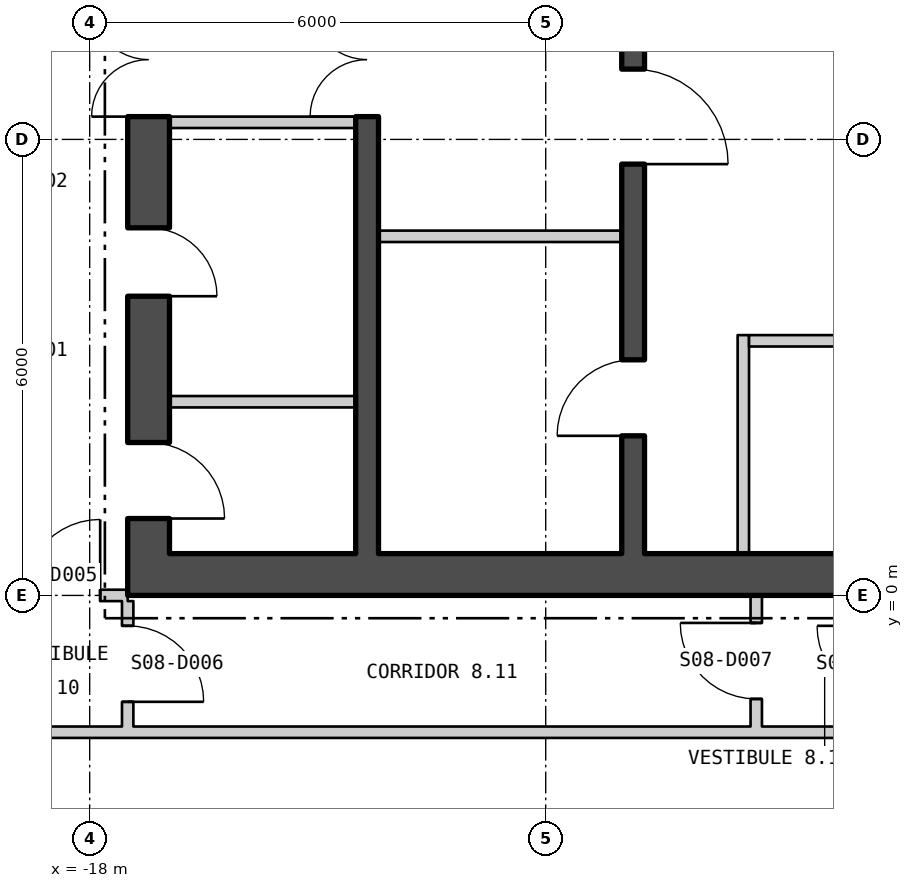
"""IFC4 building model, lengths in metres.
Left out: names, types, materials, properties, quantities, classifications, styles, units other than length and angle.
Written with IfcOpenShell. Run it as: python <this file> out.ifc"""

import sys

from ifc_helpers import new_model, si_unit, direction, frame, frame_2d, origin, place, context, subcontext, project, spatial, polyline, rectangle, outline, extrude, element, fill, save


model = new_model("IFC4")
c1 = context("Model", 3, precision=1e-05, world=origin(), true_north=direction((0.0, 1.0)))
c2 = subcontext(c1, "Body", "Model", "MODEL_VIEW")
j1 = project(units=[si_unit("LENGTHUNIT", "METRE"), si_unit("PLANEANGLEUNIT", "RADIAN")], contexts=[c1])
p1 = place(None, origin())
s1 = spatial("IfcSite", under=j1, at=p1, CompositionType="ELEMENT")
p2 = place(p1, origin())
s2 = spatial("IfcBuilding", under=s1, at=p2, CompositionType="ELEMENT")
p3 = place(p2, frame((0.0, 0.0, 111.3)))
s3 = spatial("IfcBuildingStorey", under=s2, at=p3, CompositionType="ELEMENT", Elevation=111.3)
p4 = place(p3, frame((-27.595, 11.782, -0.18), z_axis=(0.0, 0.0, 1.0), x_axis=(0.500000141277, -0.866025322218, 0.0)))
e1 = element("IfcWall", 1, at=p4, inside=s3, PredefinedType="SOLIDWALL", context=c2, shape_type="SweptSolid", body=[
    extrude(outline(polyline([(-0.13, -0.225), (45.86, -0.225), (45.6, 0.225), (0.13, 0.225), (-0.13, -0.225)])), origin(), (0.0, 0.0, 1.0), 4.28),
])
p5 = place(p4, frame((1.424, 0.0, 1.08)))
e2 = element("IfcOpeningElement", 2, at=p5, cuts=e1, PredefinedType="OPENING", context=c2, shape_type="SweptSolid", body=[
    extrude(rectangle(XDim=2.4, YDim=2.6, at=frame_2d((1.2, 1.3))), frame((0.0, 0.235, 0.0), z_axis=(0.0, -1.0, 0.0), x_axis=(1.0, 0.0, 0.0)), (0.0, 0.0, 1.0), 0.47),
])
p6 = place(p4, frame((5.892, 0.0, 1.08)))
e3 = element("IfcOpeningElement", 3, at=p6, cuts=e1, PredefinedType="OPENING", context=c2, shape_type="SweptSolid", body=[
    extrude(rectangle(XDim=2.4, YDim=2.6, at=frame_2d((1.2, 1.3))), frame((0.0, 0.235, 0.0), z_axis=(0.0, -1.0, 0.0), x_axis=(1.0, 0.0, 0.0)), (0.0, 0.0, 1.0), 0.47),
])
p7 = place(p4, frame((10.399, 0.0, 1.08)))
e4 = element("IfcOpeningElement", 4, at=p7, cuts=e1, PredefinedType="OPENING", context=c2, shape_type="SweptSolid", body=[
    extrude(rectangle(XDim=2.4, YDim=2.6, at=frame_2d((1.2, 1.3))), frame((0.0, 0.235, 0.0), z_axis=(0.0, -1.0, 0.0), x_axis=(1.0, 0.0, 0.0)), (0.0, 0.0, 1.0), 0.47),
])
p8 = place(p4, frame((14.905, 0.0, 1.08)))
e5 = element("IfcOpeningElement", 5, at=p8, cuts=e1, PredefinedType="OPENING", context=c2, shape_type="SweptSolid", body=[
    extrude(rectangle(XDim=2.4, YDim=2.6, at=frame_2d((1.2, 1.3))), frame((0.0, 0.235, 0.0), z_axis=(0.0, -1.0, 0.0), x_axis=(1.0, 0.0, 0.0)), (0.0, 0.0, 1.0), 0.47),
])
p9 = place(p4, frame((19.412, 0.0, 1.08)))
e6 = element("IfcOpeningElement", 6, at=p9, cuts=e1, PredefinedType="OPENING", context=c2, shape_type="SweptSolid", body=[
    extrude(rectangle(XDim=2.4, YDim=2.6, at=frame_2d((1.2, 1.3))), frame((0.0, 0.235, 0.0), z_axis=(0.0, -1.0, 0.0), x_axis=(1.0, 0.0, 0.0)), (0.0, 0.0, 1.0), 0.47),
])
p10 = place(p4, frame((23.918, 0.0, 1.08)))
e7 = element("IfcOpeningElement", 7, at=p10, cuts=e1, PredefinedType="OPENING", context=c2, shape_type="SweptSolid", body=[
    extrude(rectangle(XDim=2.4, YDim=2.6, at=frame_2d((1.2, 1.3))), frame((0.0, 0.235, 0.0), z_axis=(0.0, -1.0, 0.0), x_axis=(1.0, 0.0, 0.0)), (0.0, 0.0, 1.0), 0.47),
])
p11 = place(p4, frame((28.425, 0.0, 1.08)))
e8 = element("IfcOpeningElement", 8, at=p11, cuts=e1, PredefinedType="OPENING", context=c2, shape_type="SweptSolid", body=[
    extrude(rectangle(XDim=2.4, YDim=2.6, at=frame_2d((1.2, 1.3))), frame((0.0, 0.235, 0.0), z_axis=(0.0, -1.0, 0.0), x_axis=(1.0, 0.0, 0.0)), (0.0, 0.0, 1.0), 0.47),
])
p12 = place(p4, frame((32.932, 0.0, 1.08)))
e9 = element("IfcOpeningElement", 9, at=p12, cuts=e1, PredefinedType="OPENING", context=c2, shape_type="SweptSolid", body=[
    extrude(rectangle(XDim=2.4, YDim=2.6, at=frame_2d((1.2, 1.3))), frame((0.0, 0.235, 0.0), z_axis=(0.0, -1.0, 0.0), x_axis=(1.0, 0.0, 0.0)), (0.0, 0.0, 1.0), 0.47),
])
p13 = place(p4, frame((37.438, 0.0, 1.08)))
e10 = element("IfcOpeningElement", 10, at=p13, cuts=e1, PredefinedType="OPENING", context=c2, shape_type="SweptSolid", body=[
    extrude(rectangle(XDim=2.4, YDim=2.6, at=frame_2d((1.2, 1.3))), frame((0.0, 0.235, 0.0), z_axis=(0.0, -1.0, 0.0), x_axis=(1.0, 0.0, 0.0)), (0.0, 0.0, 1.0), 0.47),
])
p14 = place(p4, frame((41.907, 0.0, 1.08)))
e11 = element("IfcOpeningElement", 11, at=p14, cuts=e1, PredefinedType="OPENING", context=c2, shape_type="SweptSolid", body=[
    extrude(rectangle(XDim=2.4, YDim=2.6, at=frame_2d((1.2, 1.3))), frame((0.0, 0.235, 0.0), z_axis=(0.0, -1.0, 0.0), x_axis=(1.0, 0.0, 0.0)), (0.0, 0.0, 1.0), 0.47),
])
p15 = place(p3, frame((-17.5, 0.275, 0.0), z_axis=(0.0, 0.0, 1.0), x_axis=(1.0, 0.0, 0.0)))
e12 = element("IfcWall", 12, at=p15, inside=s3, PredefinedType="SHEAR", context=c2, shape_type="SweptSolid", body=[
    extrude(rectangle(XDim=35.0, YDim=0.55, at=frame_2d((17.5, 0.0))), origin(), (0.0, 0.0, 1.0), 4.3),
])
p16 = place(p15, frame((12.0, 0.0, 0.0)))
e13 = element("IfcOpeningElement", 13, at=p16, cuts=e12, PredefinedType="OPENING", context=c2, shape_type="SweptSolid", body=[
    extrude(rectangle(XDim=1.8, YDim=2.4, at=frame_2d((0.9, 1.2))), frame((0.0, 0.285, 0.0), z_axis=(0.0, -1.0, 0.0), x_axis=(1.0, 0.0, 0.0)), (0.0, 0.0, 1.0), 0.57),
])
p17 = place(p15, frame((22.0, 0.0, 0.0)))
e14 = element("IfcOpeningElement", 14, at=p17, cuts=e12, PredefinedType="OPENING", context=c2, shape_type="SweptSolid", body=[
    extrude(rectangle(XDim=1.8, YDim=2.4, at=frame_2d((0.9, 1.2))), frame((0.0, 0.285, 0.0), z_axis=(0.0, -1.0, 0.0), x_axis=(1.0, 0.0, 0.0)), (0.0, 0.0, 1.0), 0.57),
])
p18 = place(p3, frame((-17.225, 0.55, 0.0), z_axis=(0.0, 0.0, 1.0), x_axis=(0.0, 1.0, 0.0)))
e15 = element("IfcWall", 15, at=p18, inside=s3, PredefinedType="SHEAR", context=c2, shape_type="SweptSolid", body=[
    extrude(rectangle(XDim=16.9, YDim=0.55, at=frame_2d((8.45, 0.0))), origin(), (0.0, 0.0, 1.0), 4.3),
])
p19 = place(p18, frame((5.75, 0.0, 0.0)))
e16 = element("IfcOpeningElement", 16, at=p19, cuts=e15, PredefinedType="OPENING", context=c2, shape_type="SweptSolid", body=[
    extrude(rectangle(XDim=1.5, YDim=2.1, at=frame_2d((0.75, 1.05))), frame((0.0, 0.285, 0.0), z_axis=(0.0, -1.0, 0.0), x_axis=(1.0, 0.0, 0.0)), (0.0, 0.0, 1.0), 0.57),
])
p20 = place(p18, frame((0.462, 0.0, 0.0)))
e17 = element("IfcOpeningElement", 17, at=p20, cuts=e15, PredefinedType="OPENING", context=c2, shape_type="SweptSolid", body=[
    extrude(rectangle(XDim=1.0, YDim=2.1, at=frame_2d((0.5, 1.05))), frame((0.0, 0.285, 0.0), z_axis=(0.0, -1.0, 0.0), x_axis=(1.0, 0.0, 0.0)), (0.0, 0.0, 1.0), 0.57),
])
p21 = place(p18, frame((3.387, 0.0, 0.0)))
e18 = element("IfcOpeningElement", 18, at=p21, cuts=e15, PredefinedType="OPENING", context=c2, shape_type="SweptSolid", body=[
    extrude(rectangle(XDim=0.9, YDim=2.1, at=frame_2d((0.45, 1.05))), frame((0.0, 0.285, 0.0), z_axis=(0.0, -1.0, 0.0), x_axis=(1.0, 0.0, 0.0)), (0.0, 0.0, 1.0), 0.57),
])
p22 = place(p18, frame((7.942, 0.0, 0.0)))
e19 = element("IfcOpeningElement", 19, at=p22, cuts=e15, PredefinedType="OPENING", context=c2, shape_type="SweptSolid", body=[
    extrude(rectangle(XDim=0.9, YDim=2.1, at=frame_2d((0.45, 1.05))), frame((0.0, 0.285, 0.0), z_axis=(0.0, -1.0, 0.0), x_axis=(1.0, 0.0, 0.0)), (0.0, 0.0, 1.0), 0.57),
])
p23 = place(p18, frame((12.767, 0.0, 0.0)))
e20 = element("IfcOpeningElement", 20, at=p23, cuts=e15, PredefinedType="OPENING", context=c2, shape_type="SweptSolid", body=[
    extrude(rectangle(XDim=0.9, YDim=2.1, at=frame_2d((0.45, 1.05))), frame((0.0, 0.285, 0.0), z_axis=(0.0, -1.0, 0.0), x_axis=(1.0, 0.0, 0.0)), (0.0, 0.0, 1.0), 0.57),
])
p24 = place(p3, frame((-10.85, 0.55, 0.0), z_axis=(0.0, 0.0, 1.0), x_axis=(0.0, 1.0, 0.0)))
e21 = element("IfcWall", 21, at=p24, inside=s3, PredefinedType="SHEAR", context=c2, shape_type="SweptSolid", body=[
    extrude(rectangle(XDim=16.9, YDim=0.3, at=frame_2d((8.45, 0.0))), origin(), (0.0, 0.0, 1.0), 4.3),
])
p25 = place(p24, frame((5.125, 0.0, 0.0)))
e22 = element("IfcOpeningElement", 22, at=p25, cuts=e21, PredefinedType="OPENING", context=c2, shape_type="SweptSolid", body=[
    extrude(rectangle(XDim=1.25, YDim=2.1, at=frame_2d((0.625, 1.05))), frame((0.0, 0.16, 0.0), z_axis=(0.0, -1.0, 0.0), x_axis=(1.0, 0.0, 0.0)), (0.0, 0.0, 1.0), 0.32),
])
p26 = place(p24, frame((1.55, 0.0, 0.0)))
e23 = element("IfcOpeningElement", 23, at=p26, cuts=e21, PredefinedType="OPENING", context=c2, shape_type="SweptSolid", body=[
    extrude(rectangle(XDim=1.0, YDim=2.1, at=frame_2d((0.5, 1.05))), frame((0.0, 0.16, 0.0), z_axis=(0.0, -1.0, 0.0), x_axis=(1.0, 0.0, 0.0)), (0.0, 0.0, 1.0), 0.32),
])
p27 = place(p3, frame((-14.35, 0.55, 0.0), z_axis=(0.0, 0.0, 1.0), x_axis=(0.0, 1.0, 0.0)))
e24 = element("IfcWall", 24, at=p27, inside=s3, PredefinedType="SHEAR", context=c2, shape_type="SweptSolid", body=[
    extrude(rectangle(XDim=16.9, YDim=0.3, at=frame_2d((8.45, 0.0))), origin(), (0.0, 0.0, 1.0), 4.3),
])
p28 = place(p27, frame((5.75, 0.0, 0.0)))
e25 = element("IfcOpeningElement", 25, at=p28, cuts=e24, PredefinedType="OPENING", context=c2, shape_type="SweptSolid", body=[
    extrude(rectangle(XDim=1.5, YDim=2.1, at=frame_2d((0.75, 1.05))), frame((0.0, 0.16, 0.0), z_axis=(0.0, -1.0, 0.0), x_axis=(1.0, 0.0, 0.0)), (0.0, 0.0, 1.0), 0.32),
])
p29 = place(p3, frame((-14.2, 4.725, 0.0), z_axis=(0.0, 0.0, 1.0), x_axis=(1.0, 0.0, 0.0)))
e26 = element("IfcWall", 26, at=p29, inside=s3, PredefinedType="PARTITIONING", context=c2, shape_type="SweptSolid", body=[
    extrude(rectangle(XDim=3.2, YDim=0.15, at=frame_2d((1.6, 0.0))), origin(), (0.0, 0.0, 1.0), 4.3),
])
for number, where, z_axis, x_axis in (
    (27, (-16.95, 6.225, 0.0), (0.0, 0.0, 1.0), (1.0, 0.0, 0.0)),
    (28, (-16.95, 2.549, 0.0), (0.0, 0.0, 1.0), (1.0, 0.0, 0.0)),
):
    element("IfcWall", number, at=place(p3, frame(where, z_axis=z_axis, x_axis=x_axis)), inside=s3, PredefinedType="PARTITIONING", context=c2, shape_type="SweptSolid", body=[
        extrude(rectangle(XDim=2.45, YDim=0.15, at=frame_2d((1.225, 0.0))), origin(), (0.0, 0.0, 1.0), 4.3),
    ])
p30 = place(p3, frame((-9.4, 0.55, 0.0), z_axis=(0.0, 0.0, 1.0), x_axis=(0.0, 1.0, 0.0)))
e29 = element("IfcWall", 29, at=p30, inside=s3, PredefinedType="PARTITIONING", context=c2, shape_type="SweptSolid", body=[
    extrude(rectangle(XDim=2.875, YDim=0.15, at=frame_2d((1.438, 0.0))), origin(), (0.0, 0.0, 1.0), 4.3),
])
p31 = place(p3, frame((-9.325, 3.35, 0.0), z_axis=(0.0, 0.0, 1.0), x_axis=(1.0, 0.0, 0.0)))
e30 = element("IfcWall", 30, at=p31, inside=s3, PredefinedType="PARTITIONING", context=c2, shape_type="SweptSolid", body=[
    extrude(rectangle(XDim=3.3, YDim=0.15, at=frame_2d((1.65, 0.0))), origin(), (0.0, 0.0, 1.0), 4.3),
])
p32 = place(p31, frame((1.2, 0.0, 0.0)))
e31 = element("IfcOpeningElement", 31, at=p32, cuts=e30, PredefinedType="OPENING", context=c2, shape_type="SweptSolid", body=[
    extrude(rectangle(XDim=0.9, YDim=2.1, at=frame_2d((0.45, 1.05))), frame((0.0, 0.085, 0.0), z_axis=(0.0, -1.0, 0.0), x_axis=(1.0, 0.0, 0.0)), (0.0, 0.0, 1.0), 0.17),
])
p33 = place(p3, frame((-19.225, -1.8, 0.0), z_axis=(0.0, 0.0, 1.0), x_axis=(1.0, 0.0, 0.0)))
e32 = element("IfcWall", 32, at=p33, inside=s3, PredefinedType="PARTITIONING", context=c2, shape_type="SweptSolid", body=[
    extrude(rectangle(XDim=11.72, YDim=0.15, at=frame_2d((5.86, 0.0))), origin(), (0.0, 0.0, 1.0), 4.3),
])
p34 = place(p3, frame((-19.225, 0.0, 0.0), z_axis=(0.0, 0.0, 1.0), x_axis=(1.0, 0.0, 0.0)))
e33 = element("IfcWall", 33, at=p34, inside=s3, PredefinedType="PARTITIONING", context=c2, shape_type="SweptSolid", body=[
    extrude(rectangle(XDim=1.725, YDim=0.15, at=frame_2d((0.863, 0.0))), origin(), (0.0, 0.0, 1.0), 3.7),
])
p35 = place(p34, frame((0.363, 0.0, 0.0)))
e34 = element("IfcOpeningElement", 34, at=p35, cuts=e33, PredefinedType="OPENING", context=c2, shape_type="SweptSolid", body=[
    extrude(rectangle(XDim=1.0, YDim=2.1, at=frame_2d((0.5, 1.05))), frame((0.0, 0.085, 0.0), z_axis=(0.0, -1.0, 0.0), x_axis=(1.0, 0.0, 0.0)), (0.0, 0.0, 1.0), 0.17),
])
p36 = place(p3, frame((-17.5, -1.725, 0.0), z_axis=(0.0, 0.0, 1.0), x_axis=(0.0, 1.0, 0.0)))
e35 = element("IfcWall", 35, at=p36, inside=s3, PredefinedType="PARTITIONING", context=c2, shape_type="SweptSolid", body=[
    extrude(rectangle(XDim=1.65, YDim=0.15, at=frame_2d((0.825, 0.0))), origin(), (0.0, 0.0, 1.0), 4.3),
])
p37 = place(p36, frame((0.325, 0.0, 0.0)))
e36 = element("IfcOpeningElement", 36, at=p37, cuts=e35, PredefinedType="OPENING", context=c2, shape_type="SweptSolid", body=[
    extrude(rectangle(XDim=1.0, YDim=2.1, at=frame_2d((0.5, 1.05))), frame((0.0, 0.085, 0.0), z_axis=(0.0, -1.0, 0.0), x_axis=(1.0, 0.0, 0.0)), (0.0, 0.0, 1.0), 0.17),
])
p38 = place(p3, frame((-9.23, -1.725, 0.0), z_axis=(0.0, 0.0, 1.0), x_axis=(0.0, 1.0, 0.0)))
e37 = element("IfcWall", 37, at=p38, inside=s3, PredefinedType="PARTITIONING", context=c2, shape_type="SweptSolid", body=[
    extrude(rectangle(XDim=1.725, YDim=0.15, at=frame_2d((0.863, 0.0))), origin(), (0.0, 0.0, 1.0), 4.3),
])
p39 = place(p38, frame((0.363, 0.0, 0.0)))
e38 = element("IfcOpeningElement", 38, at=p39, cuts=e37, PredefinedType="OPENING", context=c2, shape_type="SweptSolid", body=[
    extrude(rectangle(XDim=1.0, YDim=2.1, at=frame_2d((0.5, 1.05))), frame((0.0, 0.085, 0.0), z_axis=(0.0, -1.0, 0.0), x_axis=(1.0, 0.0, 0.0)), (0.0, 0.0, 1.0), 0.17),
])
p40 = place(p25, origin())
e39 = element("IfcDoor", 39, at=p40, inside=s3, OperationType="SINGLE_SWING_LEFT", PredefinedType="DOOR", context=c2, shape_type="SweptSolid", body=[
    extrude(rectangle(XDim=1.25, YDim=2.1, at=frame_2d((0.625, 1.05))), frame((0.0, 0.025, 0.0), z_axis=(0.0, -1.0, 0.0), x_axis=(1.0, 0.0, 0.0)), (0.0, 0.0, 1.0), 0.05),
])
fill(e22, e39)
p41 = place(p26, origin())
e40 = element("IfcDoor", 40, at=p41, inside=s3, OperationType="SINGLE_SWING_RIGHT", PredefinedType="DOOR", context=c2, shape_type="SweptSolid", body=[
    extrude(rectangle(XDim=1.0, YDim=2.1, at=frame_2d((0.5, 1.05))), frame((0.0, 0.025, 0.0), z_axis=(0.0, -1.0, 0.0), x_axis=(1.0, 0.0, 0.0)), (0.0, 0.0, 1.0), 0.05),
])
fill(e23, e40)
p42 = place(p28, origin())
e41 = element("IfcDoor", 41, at=p42, inside=s3, OperationType="DOUBLE_DOOR_SINGLE_SWING", PredefinedType="DOOR", context=c2, shape_type="SweptSolid", body=[
    extrude(rectangle(XDim=1.5, YDim=2.1, at=frame_2d((0.75, 1.05))), frame((0.0, 0.025, 0.0), z_axis=(0.0, -1.0, 0.0), x_axis=(1.0, 0.0, 0.0)), (0.0, 0.0, 1.0), 0.05),
])
fill(e25, e41)
p43 = place(p19, origin())
e42 = element("IfcDoor", 42, at=p43, inside=s3, OperationType="DOUBLE_DOOR_SINGLE_SWING", PredefinedType="DOOR", context=c2, shape_type="SweptSolid", body=[
    extrude(rectangle(XDim=1.5, YDim=2.1, at=frame_2d((0.75, 1.05))), frame((0.0, 0.025, 0.0), z_axis=(0.0, -1.0, 0.0), x_axis=(1.0, 0.0, 0.0)), (0.0, 0.0, 1.0), 0.05),
])
fill(e16, e42)
p44 = place(p20, origin())
e43 = element("IfcDoor", 43, at=p44, inside=s3, OperationType="SINGLE_SWING_LEFT", PredefinedType="DOOR", context=c2, shape_type="SweptSolid", body=[
    extrude(rectangle(XDim=1.0, YDim=2.1, at=frame_2d((0.5, 1.05))), frame((0.0, 0.025, 0.0), z_axis=(0.0, -1.0, 0.0), x_axis=(1.0, 0.0, 0.0)), (0.0, 0.0, 1.0), 0.05),
])
fill(e17, e43)
p45 = place(p21, origin())
e44 = element("IfcDoor", 44, at=p45, inside=s3, OperationType="SINGLE_SWING_LEFT", PredefinedType="DOOR", context=c2, shape_type="SweptSolid", body=[
    extrude(rectangle(XDim=0.9, YDim=2.1, at=frame_2d((0.45, 1.05))), frame((0.0, 0.025, 0.0), z_axis=(0.0, -1.0, 0.0), x_axis=(1.0, 0.0, 0.0)), (0.0, 0.0, 1.0), 0.05),
])
fill(e18, e44)
p46 = place(p35, origin())
e45 = element("IfcDoor", 45, at=p46, inside=s3, OperationType="SINGLE_SWING_LEFT", PredefinedType="DOOR", context=c2, shape_type="SweptSolid", body=[
    extrude(rectangle(XDim=1.0, YDim=2.1, at=frame_2d((0.5, 1.05))), frame((0.0, 0.025, 0.0), z_axis=(0.0, -1.0, 0.0), x_axis=(1.0, 0.0, 0.0)), (0.0, 0.0, 1.0), 0.05),
])
fill(e34, e45)
p47 = place(p37, origin())
e46 = element("IfcDoor", 46, at=p47, inside=s3, OperationType="SINGLE_SWING_LEFT", PredefinedType="DOOR", context=c2, shape_type="SweptSolid", body=[
    extrude(rectangle(XDim=1.0, YDim=2.1, at=frame_2d((0.5, 1.05))), frame((0.0, 0.025, 0.0), z_axis=(0.0, -1.0, 0.0), x_axis=(1.0, 0.0, 0.0)), (0.0, 0.0, 1.0), 0.05),
])
fill(e36, e46)
p48 = place(p39, origin())
e47 = element("IfcDoor", 47, at=p48, inside=s3, OperationType="SINGLE_SWING_LEFT", PredefinedType="DOOR", context=c2, shape_type="SweptSolid", body=[
    extrude(rectangle(XDim=1.0, YDim=2.1, at=frame_2d((0.5, 1.05))), frame((0.0, 0.025, 0.0), z_axis=(0.0, -1.0, 0.0), x_axis=(1.0, 0.0, 0.0)), (0.0, 0.0, 1.0), 0.05),
])
fill(e38, e47)
save(model, sys.argv[1])
